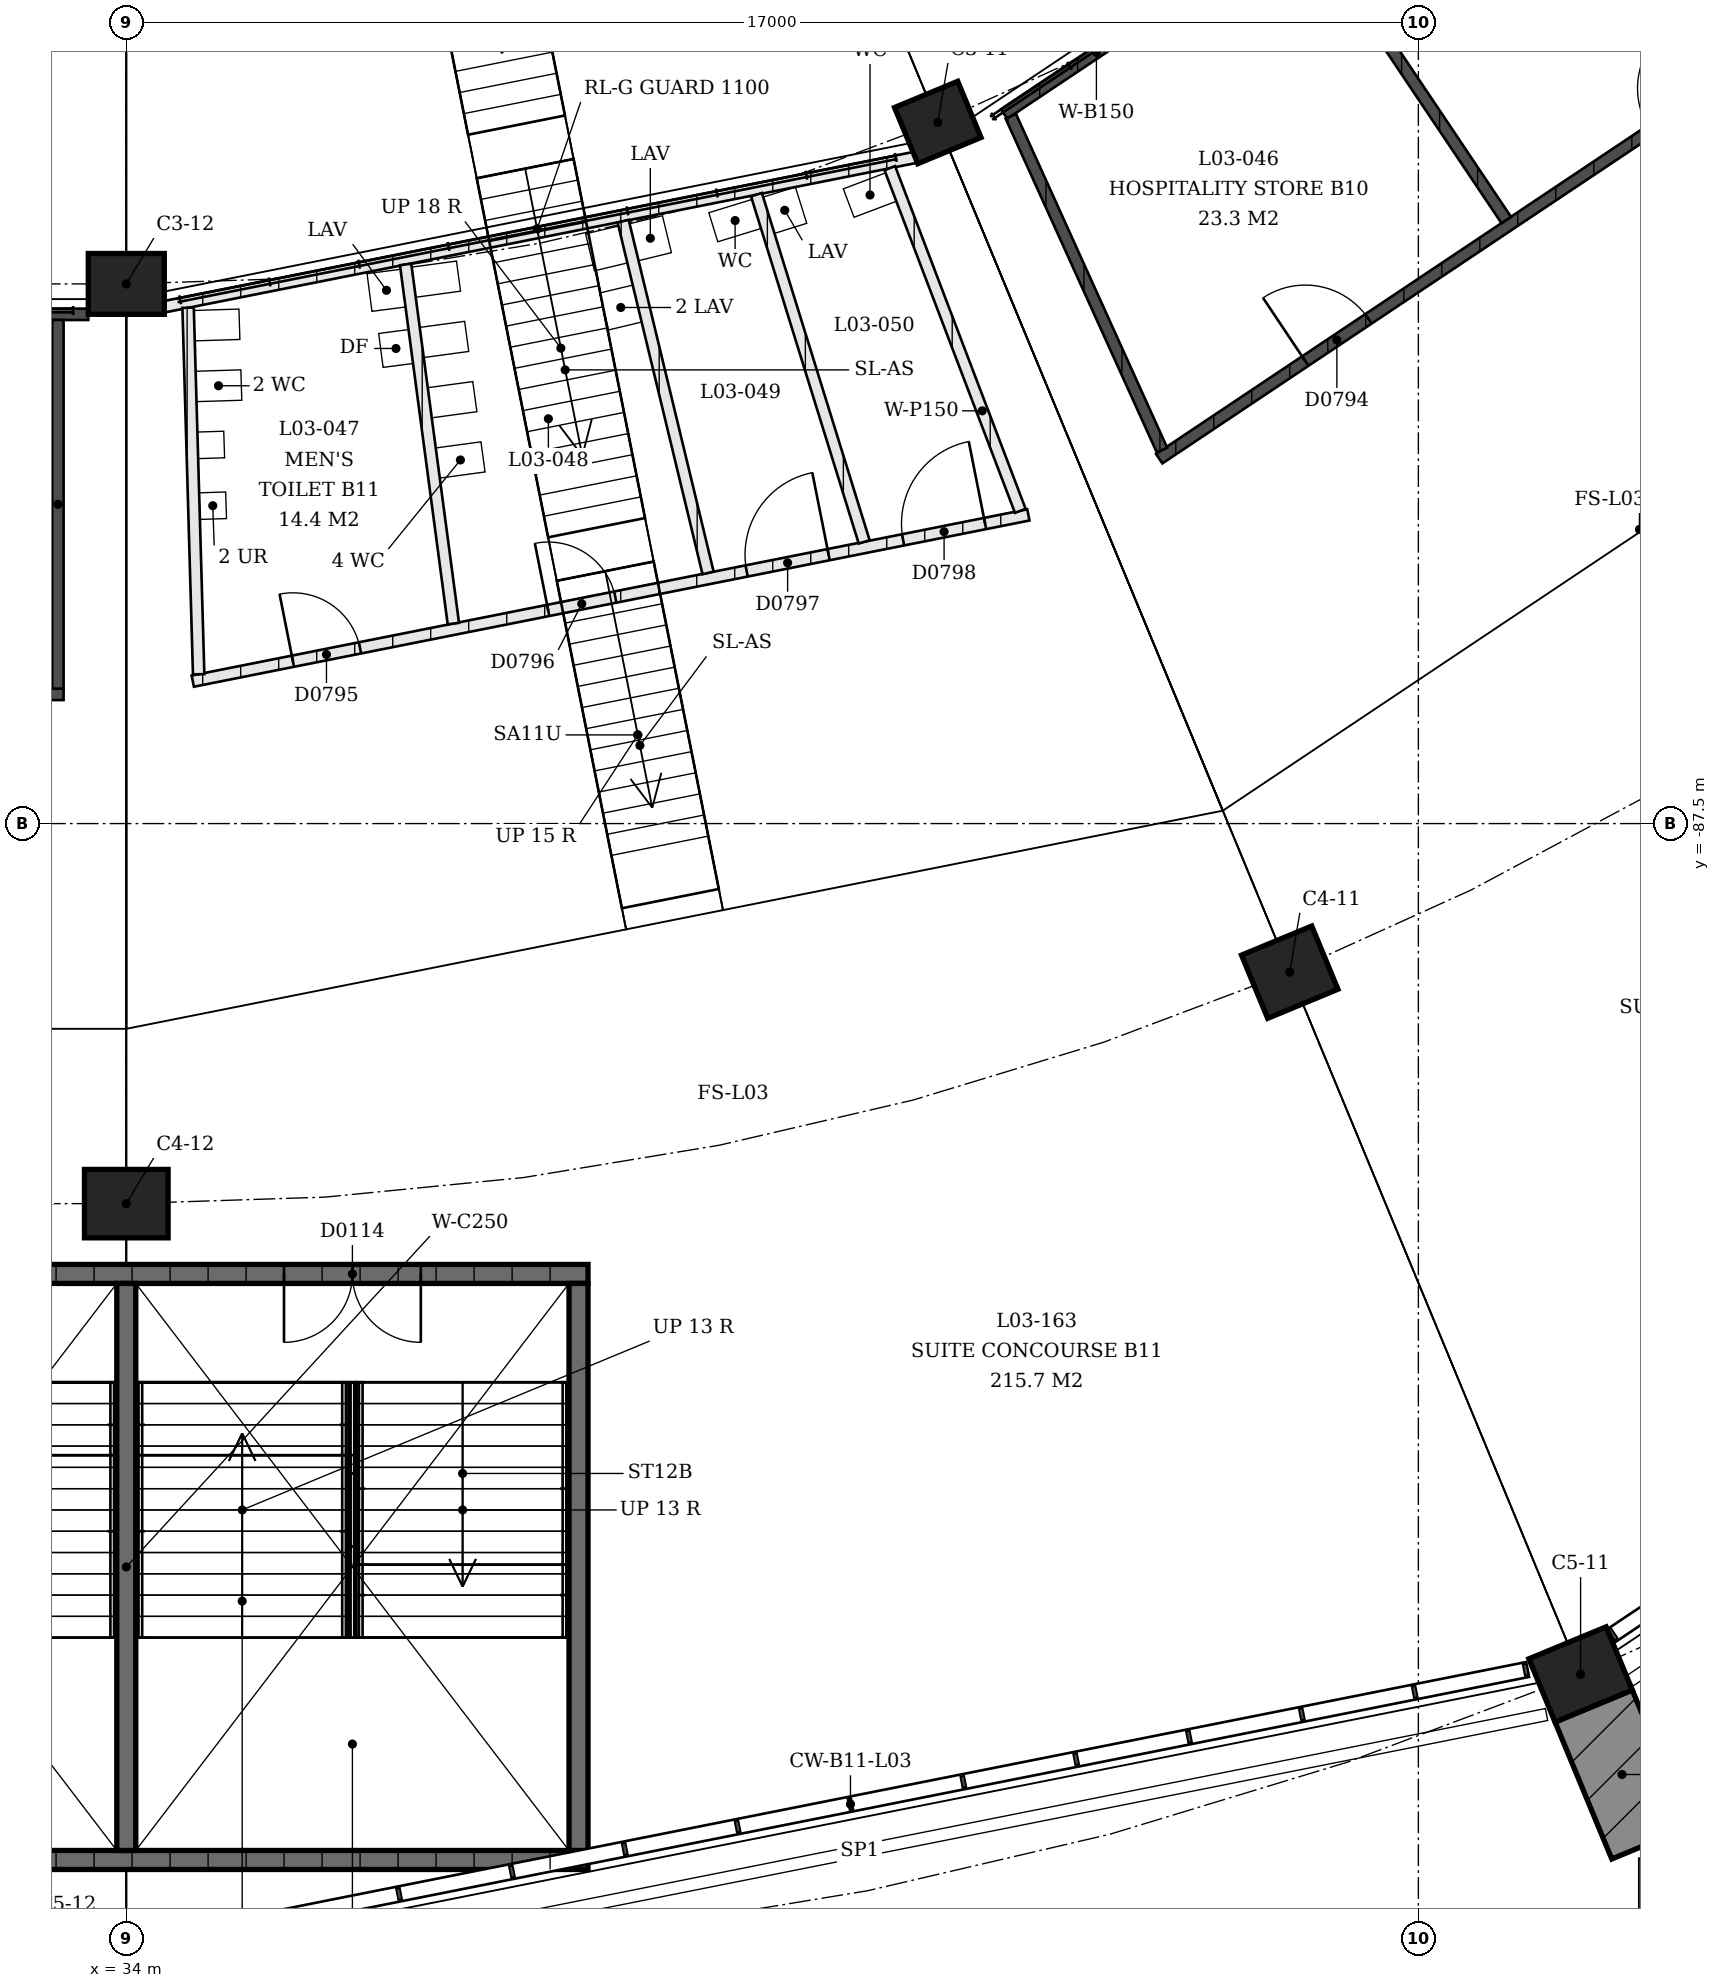
"""IFC4 building model, lengths in metres.
Left out: names, types, materials, properties, quantities, classifications, styles, units other than length and angle.
Written with IfcOpenShell. Run it as: python <this file> out.ifc"""

import sys

from ifc_helpers import new_model, si_unit, direction, frame, frame_2d, origin, origin_2d, place, context, subcontext, project, spatial, rectangle, extrude, element, fill, save


model = new_model("IFC4")
c1 = context("Model", 3, precision=1e-05, world=origin(), true_north=direction((0.0, 1.0)))
c2 = subcontext(c1, "Body", "Model", "MODEL_VIEW")
j1 = project(units=[si_unit("LENGTHUNIT", "METRE"), si_unit("PLANEANGLEUNIT", "RADIAN")], contexts=[c1])
p1 = place(None, origin())
s1 = spatial("IfcSite", under=j1, at=p1, CompositionType="ELEMENT")
p2 = place(p1, origin())
s2 = spatial("IfcBuilding", under=s1, at=p2, CompositionType="ELEMENT")
p3 = place(p2, frame((0.0, 0.0, 13.5)))
s3 = spatial("IfcBuildingStorey", under=s2, at=p3, CompositionType="ELEMENT", Elevation=13.5)
p4 = place(p3, frame((44.677, -78.276, 0.0), z_axis=(0.0, 0.0, 1.0), x_axis=(0.923879532511, 0.382683432365, 0.0)))
e1 = element("IfcColumn", 1, at=p4, inside=s3, PredefinedType="COLUMN", context=c2, shape_type="SweptSolid", body=[
    extrude(rectangle(XDim=0.9, YDim=0.8, at=origin_2d()), origin(), (0.0, 0.0, 1.0), 2.033),
])
p5 = place(p3, frame((49.307, -89.455, 0.0), z_axis=(0.0, 0.0, 1.0), x_axis=(0.923879532511, 0.382683432365, 0.0)))
e2 = element("IfcColumn", 2, at=p5, inside=s3, PredefinedType="COLUMN", context=c2, shape_type="SweptSolid", body=[
    extrude(rectangle(XDim=1.0, YDim=0.9, at=origin_2d()), origin(), (0.0, 0.0, 1.0), 4.5),
])
p6 = place(p3, frame((53.134, -98.694, 0.0), z_axis=(0.0, 0.0, 1.0), x_axis=(0.923879532511, 0.382683432365, 0.0)))
e3 = element("IfcColumn", 3, at=p6, inside=s3, PredefinedType="COLUMN", context=c2, shape_type="SweptSolid", body=[
    extrude(rectangle(XDim=1.1, YDim=0.9, at=origin_2d()), origin(), (0.0, 0.0, 1.0), 4.5),
])
p7 = place(p3, frame((34.0, -80.4, 0.0), z_axis=(0.0, 0.0, 1.0), x_axis=(1.0, 0.0, 0.0)))
e4 = element("IfcColumn", 4, at=p7, inside=s3, PredefinedType="COLUMN", context=c2, shape_type="SweptSolid", body=[
    extrude(rectangle(XDim=1.0, YDim=0.8, at=origin_2d()), origin(), (0.0, 0.0, 1.0), 2.033),
])
p8 = place(p3, frame((34.0, -92.5, 0.0), z_axis=(0.0, 0.0, 1.0), x_axis=(1.0, 0.0, 0.0)))
e5 = element("IfcColumn", 5, at=p8, inside=s3, PredefinedType="COLUMN", context=c2, shape_type="SweptSolid", body=[
    extrude(rectangle(XDim=1.1, YDim=0.9, at=origin_2d()), origin(), (0.0, 0.0, 1.0), 4.5),
])
p9 = place(p3, frame((27.925, -93.425, 0.0), z_axis=(0.0, 0.0, 1.0), x_axis=(1.0, 0.0, 0.0)))
e6 = element("IfcWall", 6, at=p9, inside=s3, PredefinedType="SHEAR", context=c2, shape_type="SweptSolid", body=[
    extrude(rectangle(XDim=12.15, YDim=0.25, at=frame_2d((6.075, 0.0))), origin(), (0.0, 0.0, 1.0), 4.09),
])
p10 = place(p9, frame((2.2, 0.0, 0.0)))
e7 = element("IfcOpeningElement", 7, at=p10, cuts=e6, PredefinedType="OPENING", context=c2, shape_type="SweptSolid", body=[
    extrude(rectangle(XDim=1.8, YDim=2.1, at=frame_2d((0.9, 1.05))), frame((0.0, 0.125, 0.0), z_axis=(0.0, -1.0, 0.0), x_axis=(1.0, 0.0, 0.0)), (0.0, 0.0, 1.0), 0.25),
])
p11 = place(p9, frame((8.15, 0.0, 0.0)))
e8 = element("IfcOpeningElement", 8, at=p11, cuts=e6, PredefinedType="OPENING", context=c2, shape_type="SweptSolid", body=[
    extrude(rectangle(XDim=1.8, YDim=2.1, at=frame_2d((0.9, 1.05))), frame((0.0, 0.125, 0.0), z_axis=(0.0, -1.0, 0.0), x_axis=(1.0, 0.0, 0.0)), (0.0, 0.0, 1.0), 0.25),
])
p12 = place(p3, frame((27.925, -101.135, 0.0), z_axis=(0.0, 0.0, 1.0), x_axis=(1.0, 0.0, 0.0)))
e9 = element("IfcWall", 9, at=p12, inside=s3, PredefinedType="SHEAR", context=c2, shape_type="SweptSolid", body=[
    extrude(rectangle(XDim=12.15, YDim=0.25, at=frame_2d((6.075, 0.0))), origin(), (0.0, 0.0, 1.0), 4.09),
])
for number, where, z_axis, x_axis in (
    (10, (39.95, -93.55, 0.0), (0.0, 0.0, 1.0), (0.0, -1.0, 0.0)),
    (11, (34.0, -93.55, 0.0), (0.0, 0.0, 1.0), (0.0, -1.0, 0.0)),
):
    element("IfcWall", number, at=place(p3, frame(where, z_axis=z_axis, x_axis=x_axis)), inside=s3, PredefinedType="SHEAR", context=c2, shape_type="SweptSolid", body=[
        extrude(rectangle(XDim=7.46, YDim=0.25, at=frame_2d((3.73, 0.0))), origin(), (0.0, 0.0, 1.0), 4.09),
    ])
p13 = place(p3, frame((53.63, -72.766, 0.0), z_axis=(0.0, 0.0, 1.0), x_axis=(-0.831481684117, -0.555552165847, 0.0)))
e12 = element("IfcWall", 12, at=p13, inside=s3, PredefinedType="SOLIDWALL", context=c2, shape_type="SweptSolid", body=[
    extrude(rectangle(XDim=9.718, YDim=0.15, at=frame_2d((4.859, 0.0))), origin(), (0.0, 0.0, 1.0), 3.0),
])
p14 = place(p3, frame((56.805, -76.542, 0.0), z_axis=(0.0, 0.0, 1.0), x_axis=(-0.831470287315, -0.555569222791, 0.0)))
e13 = element("IfcWall", 13, at=p14, inside=s3, PredefinedType="SOLIDWALL", context=c2, shape_type="SweptSolid", body=[
    extrude(rectangle(XDim=11.082, YDim=0.15, at=frame_2d((5.541, 0.0))), origin(), (0.0, 0.0, 1.0), 3.0),
])
p15 = place(p14, frame((2.311, 0.0, 0.0)))
e14 = element("IfcOpeningElement", 14, at=p15, cuts=e13, PredefinedType="OPENING", context=c2, shape_type="SweptSolid", body=[
    extrude(rectangle(XDim=1.0, YDim=2.1, at=frame_2d((0.5, 1.05))), frame((0.0, 0.075, 0.0), z_axis=(0.0, -1.0, 0.0), x_axis=(1.0, 0.0, 0.0)), (0.0, 0.0, 1.0), 0.15),
])
p16 = place(p14, frame((7.771, 0.0, 0.0)))
e15 = element("IfcOpeningElement", 15, at=p16, cuts=e13, PredefinedType="OPENING", context=c2, shape_type="SweptSolid", body=[
    extrude(rectangle(XDim=1.0, YDim=2.1, at=frame_2d((0.5, 1.05))), frame((0.0, 0.075, 0.0), z_axis=(0.0, -1.0, 0.0), x_axis=(1.0, 0.0, 0.0)), (0.0, 0.0, 1.0), 0.15),
])
p17 = place(p3, frame((49.506, -75.61, 0.0), z_axis=(0.0, 0.0, 1.0), x_axis=(0.557185009832, -0.830388381915, 0.0)))
e16 = element("IfcWall", 16, at=p17, inside=s3, PredefinedType="SOLIDWALL", context=c2, shape_type="SweptSolid", body=[
    extrude(rectangle(XDim=4.757, YDim=0.15, at=frame_2d((2.378, 0.0))), origin(), (0.0, 0.0, 1.0), 3.0),
])
p18 = place(p3, frame((45.638, -78.195, 0.0), z_axis=(0.0, 0.0, 1.0), x_axis=(0.412593178732, -0.910915401596, 0.0)))
e17 = element("IfcWall", 17, at=p18, inside=s3, PredefinedType="SOLIDWALL", context=c2, shape_type="SweptSolid", body=[
    extrude(rectangle(XDim=4.821, YDim=0.15, at=frame_2d((2.411, 0.0))), origin(), (0.0, 0.0, 1.0), 3.0),
])
p19 = place(p3, frame((34.5, -80.7, 0.0), z_axis=(0.0, 0.0, 1.0), x_axis=(0.980787996346, 0.195076667554, 0.0)))
e18 = element("IfcWall", 18, at=p19, inside=s3, PredefinedType="PARTITIONING", context=c2, shape_type="SweptSolid", body=[
    extrude(rectangle(XDim=10.073, YDim=0.15, at=frame_2d((5.037, 0.0))), origin(), (0.0, 0.0, 1.0), 3.0),
])
p20 = place(p3, frame((34.875, -85.626, 0.0), z_axis=(0.0, 0.0, 1.0), x_axis=(0.980786208969, 0.195085653744, 0.0)))
e19 = element("IfcWall", 19, at=p20, inside=s3, PredefinedType="PARTITIONING", context=c2, shape_type="SweptSolid", body=[
    extrude(rectangle(XDim=11.209, YDim=0.15, at=frame_2d((5.604, 0.0))), origin(), (0.0, 0.0, 1.0), 3.0),
])
p21 = place(p20, frame((1.343, 0.0, 0.0)))
e20 = element("IfcOpeningElement", 20, at=p21, cuts=e19, PredefinedType="OPENING", context=c2, shape_type="SweptSolid", body=[
    extrude(rectangle(XDim=0.9, YDim=2.1, at=frame_2d((0.45, 1.05))), frame((0.0, 0.075, 0.0), z_axis=(0.0, -1.0, 0.0), x_axis=(1.0, 0.0, 0.0)), (0.0, 0.0, 1.0), 0.15),
])
p22 = place(p20, frame((4.768, 0.0, 0.0)))
e21 = element("IfcOpeningElement", 21, at=p22, cuts=e19, PredefinedType="OPENING", context=c2, shape_type="SweptSolid", body=[
    extrude(rectangle(XDim=0.9, YDim=2.1, at=frame_2d((0.45, 1.05))), frame((0.0, 0.075, 0.0), z_axis=(0.0, -1.0, 0.0), x_axis=(1.0, 0.0, 0.0)), (0.0, 0.0, 1.0), 0.15),
])
p23 = place(p20, frame((7.43, 0.0, 0.0)))
e22 = element("IfcOpeningElement", 22, at=p23, cuts=e19, PredefinedType="OPENING", context=c2, shape_type="SweptSolid", body=[
    extrude(rectangle(XDim=1.1, YDim=2.1, at=frame_2d((0.55, 1.05))), frame((0.0, 0.075, 0.0), z_axis=(0.0, -1.0, 0.0), x_axis=(1.0, 0.0, 0.0)), (0.0, 0.0, 1.0), 0.15),
])
p24 = place(p20, frame((9.529, 0.0, 0.0)))
e23 = element("IfcOpeningElement", 23, at=p24, cuts=e19, PredefinedType="OPENING", context=c2, shape_type="SweptSolid", body=[
    extrude(rectangle(XDim=1.1, YDim=2.1, at=frame_2d((0.55, 1.05))), frame((0.0, 0.075, 0.0), z_axis=(0.0, -1.0, 0.0), x_axis=(1.0, 0.0, 0.0)), (0.0, 0.0, 1.0), 0.15),
])
p25 = place(p3, frame((34.813, -80.713, 0.0), z_axis=(0.0, 0.0, 1.0), x_axis=(0.028793807365, -0.999585372371, 0.0)))
e24 = element("IfcWall", 24, at=p25, inside=s3, PredefinedType="PARTITIONING", context=c2, shape_type="SweptSolid", body=[
    extrude(rectangle(XDim=4.824, YDim=0.15, at=frame_2d((2.412, 0.0))), origin(), (0.0, 0.0, 1.0), 3.0),
])
p26 = place(p3, frame((37.675, -80.144, 0.0), z_axis=(0.0, 0.0, 1.0), x_axis=(0.131791297018, -0.991277485889, 0.0)))
e25 = element("IfcWall", 25, at=p26, inside=s3, PredefinedType="PARTITIONING", context=c2, shape_type="SweptSolid", body=[
    extrude(rectangle(XDim=4.766, YDim=0.15, at=frame_2d((2.383, 0.0))), origin(), (0.0, 0.0, 1.0), 3.0),
])
p27 = place(p3, frame((40.537, -79.575, 0.0), z_axis=(0.0, 0.0, 1.0), x_axis=(0.234720740692, -0.972062844619, 0.0)))
e26 = element("IfcWall", 26, at=p27, inside=s3, PredefinedType="PARTITIONING", context=c2, shape_type="SweptSolid", body=[
    extrude(rectangle(XDim=4.761, YDim=0.15, at=frame_2d((2.38, 0.0))), origin(), (0.0, 0.0, 1.0), 3.0),
])
p28 = place(p3, frame((42.291, -79.226, 0.0), z_axis=(0.0, 0.0, 1.0), x_axis=(0.296312515745, -0.955091039123, 0.0)))
e27 = element("IfcWall", 27, at=p28, inside=s3, PredefinedType="PARTITIONING", context=c2, shape_type="SweptSolid", body=[
    extrude(rectangle(XDim=4.783, YDim=0.15, at=frame_2d((2.392, 0.0))), origin(), (0.0, 0.0, 1.0), 3.0),
])
p29 = place(p3, frame((44.045, -78.877, 0.0), z_axis=(0.0, 0.0, 1.0), x_axis=(0.355921670207, -0.934515791561, 0.0)))
e28 = element("IfcWall", 28, at=p29, inside=s3, PredefinedType="PARTITIONING", context=c2, shape_type="SweptSolid", body=[
    extrude(rectangle(XDim=4.824, YDim=0.15, at=frame_2d((2.412, 0.0))), origin(), (0.0, 0.0, 1.0), 3.0),
])
p30 = place(p3, frame((33.5, -80.8, 0.0), z_axis=(0.0, 0.0, 1.0), x_axis=(-1.0, 0.0, 0.0)))
e29 = element("IfcWall", 29, at=p30, inside=s3, PredefinedType="SOLIDWALL", context=c2, shape_type="SweptSolid", body=[
    extrude(rectangle(XDim=12.275, YDim=0.15, at=frame_2d((6.137, 0.0))), origin(), (0.0, 0.0, 1.0), 3.0),
])
p31 = place(p3, frame((33.175, -85.8, 0.0), z_axis=(0.0, 0.0, 1.0), x_axis=(-1.0, 0.0, 0.0)))
e30 = element("IfcWall", 30, at=p31, inside=s3, PredefinedType="SOLIDWALL", context=c2, shape_type="SweptSolid", body=[
    extrude(rectangle(XDim=11.95, YDim=0.15, at=frame_2d((5.975, 0.0))), origin(), (0.0, 0.0, 1.0), 3.0),
])
p32 = place(p31, frame((2.525, 0.0, 0.0)))
e31 = element("IfcOpeningElement", 31, at=p32, cuts=e30, PredefinedType="OPENING", context=c2, shape_type="SweptSolid", body=[
    extrude(rectangle(XDim=1.0, YDim=2.1, at=frame_2d((0.5, 1.05))), frame((0.0, 0.075, 0.0), z_axis=(0.0, -1.0, 0.0), x_axis=(1.0, 0.0, 0.0)), (0.0, 0.0, 1.0), 0.15),
])
p33 = place(p31, frame((8.425, 0.0, 0.0)))
e32 = element("IfcOpeningElement", 32, at=p33, cuts=e30, PredefinedType="OPENING", context=c2, shape_type="SweptSolid", body=[
    extrude(rectangle(XDim=1.0, YDim=2.1, at=frame_2d((0.5, 1.05))), frame((0.0, 0.075, 0.0), z_axis=(0.0, -1.0, 0.0), x_axis=(1.0, 0.0, 0.0)), (0.0, 0.0, 1.0), 0.15),
])
p34 = place(p3, frame((33.1, -80.875, 0.0), z_axis=(0.0, 0.0, 1.0), x_axis=(0.0, -1.0, 0.0)))
e33 = element("IfcWall", 33, at=p34, inside=s3, PredefinedType="SOLIDWALL", context=c2, shape_type="SweptSolid", body=[
    extrude(rectangle(XDim=4.85, YDim=0.15, at=frame_2d((2.425, 0.0))), origin(), (0.0, 0.0, 1.0), 3.0),
])
p35 = place(p11, origin())
e34 = element("IfcDoor", 34, at=p35, inside=s3, OperationType="DOUBLE_DOOR_SINGLE_SWING", PredefinedType="DOOR", context=c2, shape_type="SweptSolid", body=[
    extrude(rectangle(XDim=1.8, YDim=2.1, at=frame_2d((0.9, 1.05))), frame((0.0, 0.025, 0.0), z_axis=(0.0, -1.0, 0.0), x_axis=(1.0, 0.0, 0.0)), (0.0, 0.0, 1.0), 0.05),
])
fill(e8, e34)
p36 = place(p16, origin())
e35 = element("IfcDoor", 35, at=p36, inside=s3, OperationType="SINGLE_SWING_RIGHT", PredefinedType="DOOR", context=c2, shape_type="SweptSolid", body=[
    extrude(rectangle(XDim=1.0, YDim=2.1, at=frame_2d((0.5, 1.05))), frame((0.0, 0.025, 0.0), z_axis=(0.0, -1.0, 0.0), x_axis=(1.0, 0.0, 0.0)), (0.0, 0.0, 1.0), 0.05),
])
fill(e15, e35)
p37 = place(p21, origin())
e36 = element("IfcDoor", 36, at=p37, inside=s3, OperationType="SINGLE_SWING_RIGHT", PredefinedType="DOOR", context=c2, shape_type="SweptSolid", body=[
    extrude(rectangle(XDim=0.9, YDim=2.1, at=frame_2d((0.45, 1.05))), frame((0.0, 0.025, 0.0), z_axis=(0.0, -1.0, 0.0), x_axis=(1.0, 0.0, 0.0)), (0.0, 0.0, 1.0), 0.05),
])
fill(e20, e36)
p38 = place(p22, origin())
e37 = element("IfcDoor", 37, at=p38, inside=s3, OperationType="SINGLE_SWING_RIGHT", PredefinedType="DOOR", context=c2, shape_type="SweptSolid", body=[
    extrude(rectangle(XDim=0.9, YDim=2.1, at=frame_2d((0.45, 1.05))), frame((0.0, 0.025, 0.0), z_axis=(0.0, -1.0, 0.0), x_axis=(1.0, 0.0, 0.0)), (0.0, 0.0, 1.0), 0.05),
])
fill(e21, e37)
p39 = place(p23, origin())
e38 = element("IfcDoor", 38, at=p39, inside=s3, OperationType="SINGLE_SWING_LEFT", PredefinedType="DOOR", context=c2, shape_type="SweptSolid", body=[
    extrude(rectangle(XDim=1.1, YDim=2.1, at=frame_2d((0.55, 1.05))), frame((0.0, 0.025, 0.0), z_axis=(0.0, -1.0, 0.0), x_axis=(1.0, 0.0, 0.0)), (0.0, 0.0, 1.0), 0.05),
])
fill(e22, e38)
p40 = place(p24, origin())
e39 = element("IfcDoor", 39, at=p40, inside=s3, OperationType="SINGLE_SWING_LEFT", PredefinedType="DOOR", context=c2, shape_type="SweptSolid", body=[
    extrude(rectangle(XDim=1.1, YDim=2.1, at=frame_2d((0.55, 1.05))), frame((0.0, 0.025, 0.0), z_axis=(0.0, -1.0, 0.0), x_axis=(1.0, 0.0, 0.0)), (0.0, 0.0, 1.0), 0.05),
])
fill(e23, e39)
save(model, sys.argv[1])
